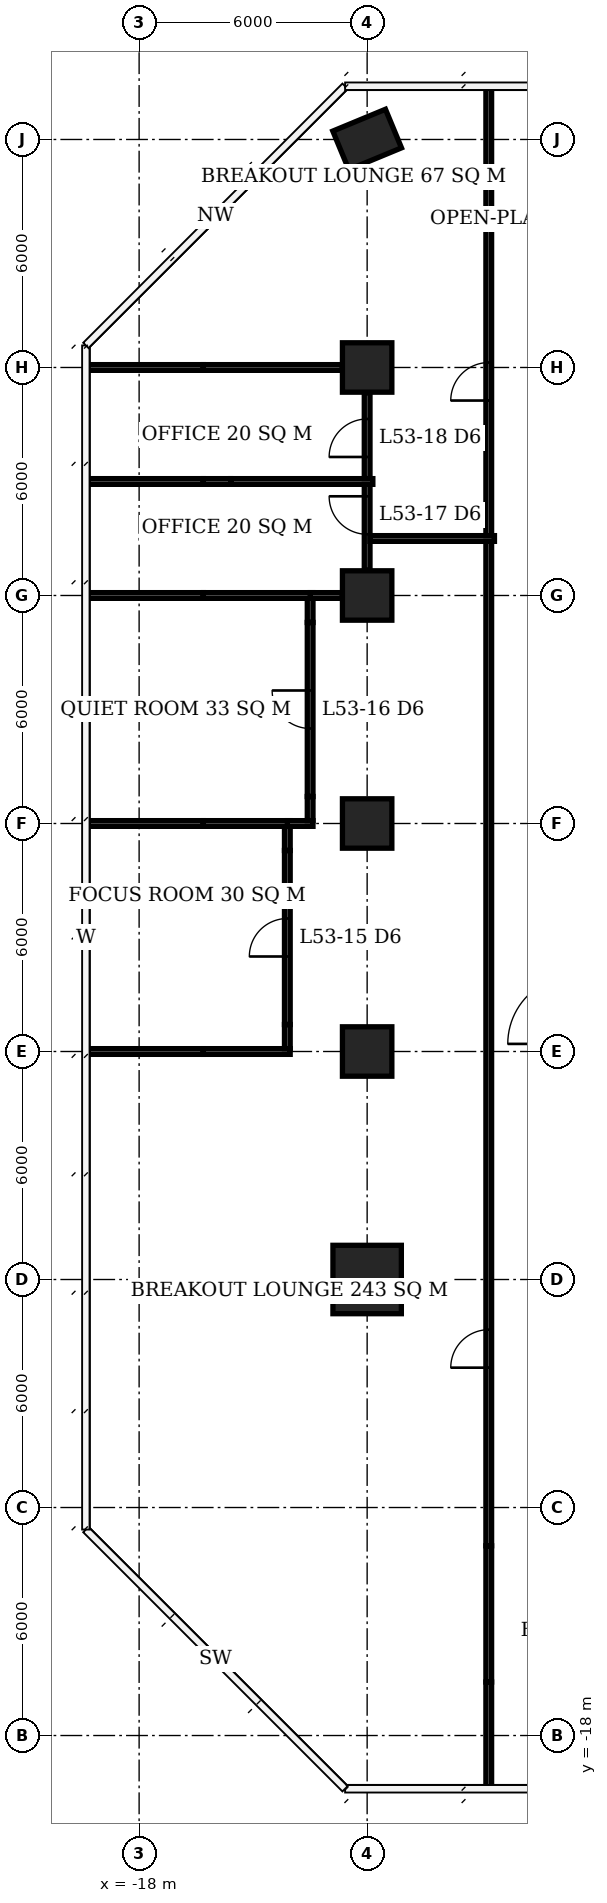
"""IFC4 building model, lengths in metres.
Left out: names, types, materials, properties, quantities, classifications, styles, units other than length and angle.
Written with IfcOpenShell. Run it as: python <this file> out.ifc"""

import sys

from ifc_helpers import new_model, si_unit, direction, frame, frame_2d, origin, origin_2d, place, context, subcontext, project, spatial, rectangle, extrude, element, fill, save


model = new_model("IFC4")
c1 = context("Model", 3, precision=1e-05, world=origin(), true_north=direction((0.0, 1.0)))
c2 = subcontext(c1, "Body", "Model", "MODEL_VIEW")
j1 = project(units=[si_unit("LENGTHUNIT", "METRE"), si_unit("PLANEANGLEUNIT", "RADIAN")], contexts=[c1])
p1 = place(None, origin())
s1 = spatial("IfcSite", under=j1, at=p1, CompositionType="ELEMENT")
p2 = place(p1, origin())
s2 = spatial("IfcBuilding", under=s1, at=p2, CompositionType="ELEMENT")
p3 = place(p2, frame((0.0, 0.0, 216.2)))
s3 = spatial("IfcBuildingStorey", under=s2, at=p3, CompositionType="ELEMENT", Elevation=216.2)
p4 = place(p3, frame((-12.0, -6.0, 0.0), z_axis=(0.0, 0.0, 1.0), x_axis=(1.0, 0.0, 0.0)))
e1 = element("IfcColumn", 1, at=p4, inside=s3, PredefinedType="COLUMN", context=c2, shape_type="SweptSolid", body=[
    extrude(rectangle(XDim=1.8, YDim=1.8, at=origin_2d()), origin(), (0.0, 0.0, 1.0), 3.9),
])
for number, where, z_axis, x_axis in (
    (2, (-12.0, 0.0, 0.0), (0.0, 0.0, 1.0), (1.0, 0.0, 0.0)),
    (3, (-12.0, 6.0, 0.0), (0.0, 0.0, 1.0), (1.0, 0.0, 0.0)),
    (4, (-12.0, 12.0, 0.0), (0.0, 0.0, 1.0), (1.0, 0.0, 0.0)),
    (5, (-12.0, 18.0, 0.0), (0.0, 0.0, 1.0), (1.0, 0.0, 0.0)),
):
    element("IfcColumn", number, at=place(p3, frame(where, z_axis=z_axis, x_axis=x_axis)), inside=s3, PredefinedType="COLUMN", context=c2, shape_type="SweptSolid", body=[
        extrude(rectangle(XDim=1.3, YDim=1.3, at=origin_2d()), origin(), (0.0, 0.0, 1.0), 3.9),
    ])
p5 = place(p3, frame((-12.0, 24.0, 0.0), z_axis=(0.0, 0.0, 1.0), x_axis=(0.923879532511, 0.382683432365, 0.0)))
e6 = element("IfcColumn", 6, at=p5, inside=s3, PredefinedType="COLUMN", context=c2, shape_type="SweptSolid", body=[
    extrude(rectangle(XDim=1.5, YDim=1.1, at=origin_2d()), origin(), (0.0, 0.0, 1.0), 3.9),
])
p6 = place(p3, frame((-19.35, 0.0, 0.0), z_axis=(0.0, 0.0, 1.0), x_axis=(1.0, 0.0, 0.0)))
e7 = element("IfcWall", 7, at=p6, inside=s3, PredefinedType="PARTITIONING", context=c2, shape_type="SweptSolid", body=[
    extrude(rectangle(XDim=3.04, YDim=0.15, at=frame_2d((1.52, 0.0))), origin(), (0.0, 0.0, 1.0), 3.65),
])
p7 = place(p3, frame((-16.31, 0.0, 0.0), z_axis=(0.0, 0.0, 1.0), x_axis=(1.0, 0.0, 0.0)))
e8 = element("IfcWall", 8, at=p7, inside=s3, PredefinedType="PARTITIONING", context=c2, shape_type="SweptSolid", body=[
    extrude(rectangle(XDim=2.285, YDim=0.15, at=frame_2d((1.143, 0.0))), origin(), (0.0, 0.0, 1.0), 2.65),
])
p8 = place(p3, frame((-19.35, 6.0, 0.0), z_axis=(0.0, 0.0, 1.0), x_axis=(1.0, 0.0, 0.0)))
e9 = element("IfcWall", 9, at=p8, inside=s3, PredefinedType="PARTITIONING", context=c2, shape_type="SweptSolid", body=[
    extrude(rectangle(XDim=3.04, YDim=0.15, at=frame_2d((1.52, 0.0))), origin(), (0.0, 0.0, 1.0), 3.65),
])
p9 = place(p3, frame((-16.31, 6.0, 0.0), z_axis=(0.0, 0.0, 1.0), x_axis=(1.0, 0.0, 0.0)))
e10 = element("IfcWall", 10, at=p9, inside=s3, PredefinedType="PARTITIONING", context=c2, shape_type="SweptSolid", body=[
    extrude(rectangle(XDim=2.285, YDim=0.15, at=frame_2d((1.143, 0.0))), origin(), (0.0, 0.0, 1.0), 2.65),
])
p10 = place(p3, frame((-14.1, 6.0, 0.0), z_axis=(0.0, 0.0, 1.0), x_axis=(1.0, 0.0, 0.0)))
e11 = element("IfcWall", 11, at=p10, inside=s3, PredefinedType="PARTITIONING", context=c2, shape_type="SweptSolid", body=[
    extrude(rectangle(XDim=0.675, YDim=0.15, at=frame_2d((0.337, 0.0))), origin(), (0.0, 0.0, 1.0), 2.65),
])
p11 = place(p3, frame((-19.4, 12.0, 0.0), z_axis=(0.0, 0.0, 1.0), x_axis=(1.0, 0.0, 0.0)))
e12 = element("IfcWall", 12, at=p11, inside=s3, PredefinedType="PARTITIONING", context=c2, shape_type="SweptSolid", body=[
    extrude(rectangle(XDim=3.09, YDim=0.15, at=frame_2d((1.545, 0.0))), origin(), (0.0, 0.0, 1.0), 3.65),
])
p12 = place(p3, frame((-16.31, 12.0, 0.0), z_axis=(0.0, 0.0, 1.0), x_axis=(1.0, 0.0, 0.0)))
e13 = element("IfcWall", 13, at=p12, inside=s3, PredefinedType="PARTITIONING", context=c2, shape_type="SweptSolid", body=[
    extrude(rectangle(XDim=2.885, YDim=0.15, at=frame_2d((1.442, 0.0))), origin(), (0.0, 0.0, 1.0), 2.65),
])
p13 = place(p3, frame((-13.5, 12.0, 0.0), z_axis=(0.0, 0.0, 1.0), x_axis=(1.0, 0.0, 0.0)))
e14 = element("IfcWall", 14, at=p13, inside=s3, PredefinedType="PARTITIONING", context=c2, shape_type="SweptSolid", body=[
    extrude(rectangle(XDim=0.85, YDim=0.15, at=frame_2d((0.425, 0.0))), origin(), (0.0, 0.0, 1.0), 2.65),
])
p14 = place(p3, frame((-19.4, 15.0, 0.0), z_axis=(0.0, 0.0, 1.0), x_axis=(1.0, 0.0, 0.0)))
e15 = element("IfcWall", 15, at=p14, inside=s3, PredefinedType="PARTITIONING", context=c2, shape_type="SweptSolid", body=[
    extrude(rectangle(XDim=3.09, YDim=0.15, at=frame_2d((1.545, 0.0))), origin(), (0.0, 0.0, 1.0), 3.65),
])
p15 = place(p3, frame((-16.31, 15.0, 0.0), z_axis=(0.0, 0.0, 1.0), x_axis=(1.0, 0.0, 0.0)))
e16 = element("IfcWall", 16, at=p15, inside=s3, PredefinedType="PARTITIONING", context=c2, shape_type="SweptSolid", body=[
    extrude(rectangle(XDim=0.72, YDim=0.15, at=frame_2d((0.36, 0.0))), origin(), (0.0, 0.0, 1.0), 2.65),
])
p16 = place(p3, frame((-15.59, 15.0, 0.0), z_axis=(0.0, 0.0, 1.0), x_axis=(1.0, 0.0, 0.0)))
e17 = element("IfcWall", 17, at=p16, inside=s3, PredefinedType="PARTITIONING", context=c2, shape_type="SweptSolid", body=[
    extrude(rectangle(XDim=3.74, YDim=0.15, at=frame_2d((1.87, 0.0))), origin(), (0.0, 0.0, 1.0), 3.65),
])
p17 = place(p3, frame((-19.4, 18.0, 0.0), z_axis=(0.0, 0.0, 1.0), x_axis=(1.0, 0.0, 0.0)))
e18 = element("IfcWall", 18, at=p17, inside=s3, PredefinedType="PARTITIONING", context=c2, shape_type="SweptSolid", body=[
    extrude(rectangle(XDim=3.09, YDim=0.15, at=frame_2d((1.545, 0.0))), origin(), (0.0, 0.0, 1.0), 3.65),
])
p18 = place(p3, frame((-16.31, 18.0, 0.0), z_axis=(0.0, 0.0, 1.0), x_axis=(1.0, 0.0, 0.0)))
e19 = element("IfcWall", 19, at=p18, inside=s3, PredefinedType="PARTITIONING", context=c2, shape_type="SweptSolid", body=[
    extrude(rectangle(XDim=3.66, YDim=0.15, at=frame_2d((1.83, 0.0))), origin(), (0.0, 0.0, 1.0), 2.65),
])
p19 = place(p3, frame((-14.1, 0.075, 0.0), z_axis=(0.0, 0.0, 1.0), x_axis=(0.0, 1.0, 0.0)))
e20 = element("IfcWall", 20, at=p19, inside=s3, PredefinedType="PARTITIONING", context=c2, shape_type="SweptSolid", body=[
    extrude(rectangle(XDim=0.635, YDim=0.15, at=frame_2d((0.317, 0.0))), origin(), (0.0, 0.0, 1.0), 2.65),
])
p20 = place(p3, frame((-14.1, 0.71, 0.0), z_axis=(0.0, 0.0, 1.0), x_axis=(0.0, 1.0, 0.0)))
e21 = element("IfcWall", 21, at=p20, inside=s3, PredefinedType="PARTITIONING", context=c2, shape_type="SweptSolid", body=[
    extrude(rectangle(XDim=4.58, YDim=0.15, at=frame_2d((2.29, 0.0))), origin(), (0.0, 0.0, 1.0), 3.65),
])
p21 = place(p20, frame((1.79, 0.0, 0.0)))
e22 = element("IfcOpeningElement", 22, at=p21, cuts=e21, PredefinedType="OPENING", context=c2, shape_type="SweptSolid", body=[
    extrude(rectangle(XDim=1.0, YDim=2.1, at=frame_2d((0.5, 1.05))), frame((0.0, 0.085, 0.0), z_axis=(0.0, -1.0, 0.0), x_axis=(1.0, 0.0, 0.0)), (0.0, 0.0, 1.0), 0.17),
])
for number, where, z_axis, x_axis in (
    (23, (-14.1, 5.29, 0.0), (0.0, 0.0, 1.0), (0.0, 1.0, 0.0)),
    (24, (-13.5, 6.075, 0.0), (0.0, 0.0, 1.0), (0.0, 1.0, 0.0)),
):
    element("IfcWall", number, at=place(p3, frame(where, z_axis=z_axis, x_axis=x_axis)), inside=s3, PredefinedType="PARTITIONING", context=c2, shape_type="SweptSolid", body=[
        extrude(rectangle(XDim=0.635, YDim=0.15, at=frame_2d((0.317, 0.0))), origin(), (0.0, 0.0, 1.0), 2.65),
    ])
p22 = place(p3, frame((-13.5, 6.71, 0.0), z_axis=(0.0, 0.0, 1.0), x_axis=(0.0, 1.0, 0.0)))
e25 = element("IfcWall", 25, at=p22, inside=s3, PredefinedType="PARTITIONING", context=c2, shape_type="SweptSolid", body=[
    extrude(rectangle(XDim=4.58, YDim=0.15, at=frame_2d((2.29, 0.0))), origin(), (0.0, 0.0, 1.0), 3.65),
])
p23 = place(p22, frame((1.79, 0.0, 0.0)))
e26 = element("IfcOpeningElement", 26, at=p23, cuts=e25, PredefinedType="OPENING", context=c2, shape_type="SweptSolid", body=[
    extrude(rectangle(XDim=1.0, YDim=2.1, at=frame_2d((0.5, 1.05))), frame((0.0, 0.085, 0.0), z_axis=(0.0, -1.0, 0.0), x_axis=(1.0, 0.0, 0.0)), (0.0, 0.0, 1.0), 0.17),
])
p24 = place(p3, frame((-13.5, 11.29, 0.0), z_axis=(0.0, 0.0, 1.0), x_axis=(0.0, 1.0, 0.0)))
e27 = element("IfcWall", 27, at=p24, inside=s3, PredefinedType="PARTITIONING", context=c2, shape_type="SweptSolid", body=[
    extrude(rectangle(XDim=0.635, YDim=0.15, at=frame_2d((0.317, 0.0))), origin(), (0.0, 0.0, 1.0), 2.65),
])
p25 = place(p3, frame((-12.0, 12.66, 0.0), z_axis=(0.0, 0.0, 1.0), x_axis=(0.0, 1.0, 0.0)))
e28 = element("IfcWall", 28, at=p25, inside=s3, PredefinedType="PARTITIONING", context=c2, shape_type="SweptSolid", body=[
    extrude(rectangle(XDim=2.265, YDim=0.15, at=frame_2d((1.133, 0.0))), origin(), (0.0, 0.0, 1.0), 3.65),
])
p26 = place(p25, frame((0.95, 0.0, 0.0)))
e29 = element("IfcOpeningElement", 29, at=p26, cuts=e28, PredefinedType="OPENING", context=c2, shape_type="SweptSolid", body=[
    extrude(rectangle(XDim=1.0, YDim=2.1, at=frame_2d((0.5, 1.05))), frame((0.0, 0.085, 0.0), z_axis=(0.0, -1.0, 0.0), x_axis=(1.0, 0.0, 0.0)), (0.0, 0.0, 1.0), 0.17),
])
p27 = place(p3, frame((-12.0, 15.075, 0.0), z_axis=(0.0, 0.0, 1.0), x_axis=(0.0, 1.0, 0.0)))
e30 = element("IfcWall", 30, at=p27, inside=s3, PredefinedType="PARTITIONING", context=c2, shape_type="SweptSolid", body=[
    extrude(rectangle(XDim=2.265, YDim=0.15, at=frame_2d((1.133, 0.0))), origin(), (0.0, 0.0, 1.0), 3.65),
])
p28 = place(p27, frame((0.57, 0.0, 0.0)))
e31 = element("IfcOpeningElement", 31, at=p28, cuts=e30, PredefinedType="OPENING", context=c2, shape_type="SweptSolid", body=[
    extrude(rectangle(XDim=1.0, YDim=2.1, at=frame_2d((0.5, 1.05))), frame((0.0, 0.085, 0.0), z_axis=(0.0, -1.0, 0.0), x_axis=(1.0, 0.0, 0.0)), (0.0, 0.0, 1.0), 0.17),
])
p29 = place(p3, frame((-11.925, 13.5, 0.0), z_axis=(0.0, 0.0, 1.0), x_axis=(1.0, 0.0, 0.0)))
e32 = element("IfcWall", 32, at=p29, inside=s3, PredefinedType="PARTITIONING", context=c2, shape_type="SweptSolid", body=[
    extrude(rectangle(XDim=3.275, YDim=0.15, at=frame_2d((1.638, 0.0))), origin(), (0.0, 0.0, 1.0), 3.65),
])
p30 = place(p3, frame((-8.8, -19.4, 0.0), z_axis=(0.0, 0.0, 1.0), x_axis=(0.0, 1.0, 0.0)))
e33 = element("IfcWall", 33, at=p30, inside=s3, PredefinedType="PARTITIONING", context=c2, shape_type="SweptSolid", body=[
    extrude(rectangle(XDim=2.808, YDim=0.15, at=frame_2d((1.404, 0.0))), origin(), (0.0, 0.0, 1.0), 3.65),
])
p31 = place(p3, frame((-8.8, -16.592, 0.0), z_axis=(0.0, 0.0, 1.0), x_axis=(0.0, 1.0, 0.0)))
e34 = element("IfcWall", 34, at=p31, inside=s3, PredefinedType="PARTITIONING", context=c2, shape_type="SweptSolid", body=[
    extrude(rectangle(XDim=3.584, YDim=0.15, at=frame_2d((1.792, 0.0))), origin(), (0.0, 0.0, 1.0), 2.65),
])
p32 = place(p3, frame((-8.8, -13.008, 0.0), z_axis=(0.0, 0.0, 1.0), x_axis=(0.0, 1.0, 0.0)))
e35 = element("IfcWall", 35, at=p32, inside=s3, PredefinedType="PARTITIONING", context=c2, shape_type="SweptSolid", body=[
    extrude(rectangle(XDim=26.433, YDim=0.15, at=frame_2d((13.216, 0.0))), origin(), (0.0, 0.0, 1.0), 3.65),
])
p33 = place(p32, frame((4.688, 0.0, 0.0)))
e36 = element("IfcOpeningElement", 36, at=p33, cuts=e35, PredefinedType="OPENING", context=c2, shape_type="SweptSolid", body=[
    extrude(rectangle(XDim=1.0, YDim=2.1, at=frame_2d((0.5, 1.05))), frame((0.0, 0.085, 0.0), z_axis=(0.0, -1.0, 0.0), x_axis=(1.0, 0.0, 0.0)), (0.0, 0.0, 1.0), 0.17),
])
p34 = place(p3, frame((-8.8, 13.575, 0.0), z_axis=(0.0, 0.0, 1.0), x_axis=(0.0, 1.0, 0.0)))
e37 = element("IfcWall", 37, at=p34, inside=s3, PredefinedType="PARTITIONING", context=c2, shape_type="SweptSolid", body=[
    extrude(rectangle(XDim=11.825, YDim=0.15, at=frame_2d((5.913, 0.0))), origin(), (0.0, 0.0, 1.0), 3.65),
])
p35 = place(p34, frame((3.555, 0.0, 0.0)))
e38 = element("IfcOpeningElement", 38, at=p35, cuts=e37, PredefinedType="OPENING", context=c2, shape_type="SweptSolid", body=[
    extrude(rectangle(XDim=1.0, YDim=2.1, at=frame_2d((0.5, 1.05))), frame((0.0, 0.085, 0.0), z_axis=(0.0, -1.0, 0.0), x_axis=(1.0, 0.0, 0.0)), (0.0, 0.0, 1.0), 0.17),
])
p36 = place(p21, origin())
e39 = element("IfcDoor", 39, at=p36, inside=s3, OperationType="SINGLE_SWING_LEFT", PredefinedType="DOOR", context=c2, shape_type="SweptSolid", body=[
    extrude(rectangle(XDim=1.0, YDim=2.1, at=frame_2d((0.5, 1.05))), frame((0.0, 0.025, 0.0), z_axis=(0.0, -1.0, 0.0), x_axis=(1.0, 0.0, 0.0)), (0.0, 0.0, 1.0), 0.05),
])
fill(e22, e39)
p37 = place(p23, origin())
e40 = element("IfcDoor", 40, at=p37, inside=s3, OperationType="SINGLE_SWING_RIGHT", PredefinedType="DOOR", context=c2, shape_type="SweptSolid", body=[
    extrude(rectangle(XDim=1.0, YDim=2.1, at=frame_2d((0.5, 1.05))), frame((0.0, 0.025, 0.0), z_axis=(0.0, -1.0, 0.0), x_axis=(1.0, 0.0, 0.0)), (0.0, 0.0, 1.0), 0.05),
])
fill(e26, e40)
p38 = place(p26, origin())
e41 = element("IfcDoor", 41, at=p38, inside=s3, OperationType="SINGLE_SWING_RIGHT", PredefinedType="DOOR", context=c2, shape_type="SweptSolid", body=[
    extrude(rectangle(XDim=1.0, YDim=2.1, at=frame_2d((0.5, 1.05))), frame((0.0, 0.025, 0.0), z_axis=(0.0, -1.0, 0.0), x_axis=(1.0, 0.0, 0.0)), (0.0, 0.0, 1.0), 0.05),
])
fill(e29, e41)
p39 = place(p28, origin())
e42 = element("IfcDoor", 42, at=p39, inside=s3, OperationType="SINGLE_SWING_LEFT", PredefinedType="DOOR", context=c2, shape_type="SweptSolid", body=[
    extrude(rectangle(XDim=1.0, YDim=2.1, at=frame_2d((0.5, 1.05))), frame((0.0, 0.025, 0.0), z_axis=(0.0, -1.0, 0.0), x_axis=(1.0, 0.0, 0.0)), (0.0, 0.0, 1.0), 0.05),
])
fill(e31, e42)
p40 = place(p33, origin())
e43 = element("IfcDoor", 43, at=p40, inside=s3, OperationType="SINGLE_SWING_LEFT", PredefinedType="DOOR", context=c2, shape_type="SweptSolid", body=[
    extrude(rectangle(XDim=1.0, YDim=2.1, at=frame_2d((0.5, 1.05))), frame((0.0, 0.025, 0.0), z_axis=(0.0, -1.0, 0.0), x_axis=(1.0, 0.0, 0.0)), (0.0, 0.0, 1.0), 0.05),
])
fill(e36, e43)
p41 = place(p35, origin())
e44 = element("IfcDoor", 44, at=p41, inside=s3, OperationType="SINGLE_SWING_LEFT", PredefinedType="DOOR", context=c2, shape_type="SweptSolid", body=[
    extrude(rectangle(XDim=1.0, YDim=2.1, at=frame_2d((0.5, 1.05))), frame((0.0, 0.025, 0.0), z_axis=(0.0, -1.0, 0.0), x_axis=(1.0, 0.0, 0.0)), (0.0, 0.0, 1.0), 0.05),
])
fill(e38, e44)
save(model, sys.argv[1])
